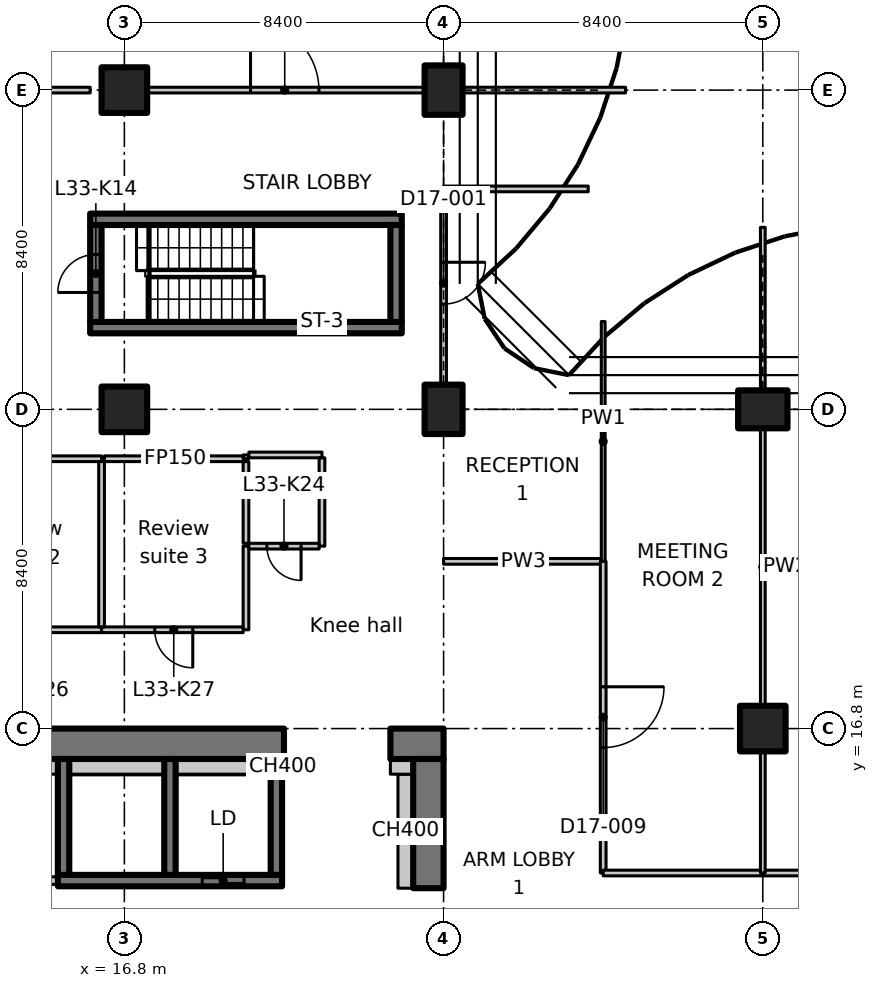
"""IFC4 building model, lengths in metres.
Left out: names, types, materials, properties, quantities, classifications, styles, units other than length and angle.
Written with IfcOpenShell. Run it as: python <this file> out.ifc"""

import sys

from ifc_helpers import new_model, si_unit, direction, frame, frame_2d, origin, origin_2d, place, context, subcontext, project, spatial, polyline, rectangle, outline, extrude, element, fill, save


model = new_model("IFC4")
c1 = context("Model", 3, precision=1e-05, world=origin(), true_north=direction((0.0, 1.0)))
c2 = subcontext(c1, "Body", "Model", "MODEL_VIEW")
j1 = project(units=[si_unit("LENGTHUNIT", "METRE"), si_unit("PLANEANGLEUNIT", "RADIAN")], contexts=[c1])
p1 = place(None, origin())
s1 = spatial("IfcSite", under=j1, at=p1, CompositionType="ELEMENT")
p2 = place(p1, origin())
s2 = spatial("IfcBuilding", under=s1, at=p2, CompositionType="ELEMENT")
p3 = place(p2, frame((0.0, 0.0, 134.9)))
s3 = spatial("IfcBuildingStorey", under=s2, at=p3, CompositionType="ELEMENT", Elevation=134.9)
for number, where, z_axis, x_axis in (
    (1, (16.8, 25.2, 0.0), (0.0, 0.0, 1.0), (1.0, 0.0, 0.0)),
    (2, (16.8, 33.6, 0.0), (0.0, 0.0, 1.0), (1.0, 0.0, 0.0)),
):
    element("IfcColumn", number, at=place(p3, frame(where, z_axis=z_axis, x_axis=x_axis)), inside=s3, PredefinedType="COLUMN", context=c2, shape_type="SweptSolid", body=[
        extrude(rectangle(XDim=1.2, YDim=1.2, at=origin_2d()), origin(), (0.0, 0.0, 1.0), 3.35),
    ])
for number, where, z_axis, x_axis in (
    (3, (25.2, 25.2, 0.0), (0.0, 0.0, 1.0), (1.0, 0.0, 0.0)),
    (4, (25.2, 33.6, 0.0), (0.0, 0.0, 1.0), (1.0, 0.0, 0.0)),
):
    element("IfcColumn", number, at=place(p3, frame(where, z_axis=z_axis, x_axis=x_axis)), inside=s3, PredefinedType="COLUMN", context=c2, shape_type="SweptSolid", body=[
        extrude(rectangle(XDim=1.0, YDim=1.3, at=origin_2d()), origin(), (0.0, 0.0, 1.0), 3.35),
    ])
p4 = place(p3, frame((33.6, 16.8, 0.0), z_axis=(0.0, 0.0, 1.0), x_axis=(1.0, 0.0, 0.0)))
e5 = element("IfcColumn", 5, at=p4, inside=s3, PredefinedType="COLUMN", context=c2, shape_type="SweptSolid", body=[
    extrude(rectangle(XDim=1.2, YDim=1.2, at=origin_2d()), origin(), (0.0, 0.0, 1.0), 3.35),
])
p5 = place(p3, frame((33.6, 25.2, 0.0), z_axis=(0.0, 0.0, 1.0), x_axis=(0.0, 1.0, 0.0)))
e6 = element("IfcColumn", 6, at=p5, inside=s3, PredefinedType="COLUMN", context=c2, shape_type="SweptSolid", body=[
    extrude(rectangle(XDim=1.0, YDim=1.3, at=origin_2d()), origin(), (0.0, 0.0, 1.0), 3.35),
])
p6 = place(p3, frame((-1.1, 16.4, 0.0), z_axis=(0.0, 0.0, 1.0), x_axis=(1.0, 0.0, 0.0)))
e7 = element("IfcWall", 7, at=p6, inside=s3, PredefinedType="SHEAR", context=c2, shape_type="SweptSolid", body=[
    extrude(rectangle(XDim=22.1, YDim=0.8, at=frame_2d((11.05, 0.0))), origin(), (0.0, 0.0, 1.0), 3.35),
])
p7 = place(p6, frame((3.15, 0.0, 0.0)))
e8 = element("IfcOpeningElement", 8, at=p7, cuts=e7, PredefinedType="OPENING", context=c2, shape_type="SweptSolid", body=[
    extrude(rectangle(XDim=1.1, YDim=2.3, at=frame_2d((0.55, 1.15))), frame((0.0, 0.41, 0.0), z_axis=(0.0, -1.0, 0.0), x_axis=(1.0, 0.0, 0.0)), (0.0, 0.0, 1.0), 0.82),
])
p8 = place(p3, frame((23.8, 16.4, 0.0), z_axis=(0.0, 0.0, 1.0), x_axis=(1.0, 0.0, 0.0)))
e9 = element("IfcWall", 9, at=p8, inside=s3, PredefinedType="SHEAR", context=c2, shape_type="SweptSolid", body=[
    extrude(rectangle(XDim=1.4, YDim=0.8, at=frame_2d((0.7, 0.0))), origin(), (0.0, 0.0, 1.0), 3.35),
])
p9 = place(p3, frame((24.8, 12.6, 0.0), z_axis=(0.0, 0.0, 1.0), x_axis=(0.0, 1.0, 0.0)))
e10 = element("IfcWall", 10, at=p9, inside=s3, PredefinedType="SHEAR", context=c2, shape_type="SweptSolid", body=[
    extrude(rectangle(XDim=3.4, YDim=0.8, at=frame_2d((1.7, 0.0))), origin(), (0.0, 0.0, 1.0), 3.35),
])
p10 = place(p3, frame((24.2, 12.6, 0.0), z_axis=(0.0, 0.0, 1.0), x_axis=(0.0, 1.0, 0.0)))
e11 = element("IfcWall", 11, at=p10, inside=s3, PredefinedType="PARTITIONING", context=c2, shape_type="SweptSolid", body=[
    extrude(rectangle(XDim=3.0, YDim=0.4, at=frame_2d((1.5, 0.0))), origin(), (0.0, 0.0, 1.0), 3.35),
])
p11 = place(p3, frame((23.8, 15.8, 0.0), z_axis=(0.0, 0.0, 1.0), x_axis=(1.0, 0.0, 0.0)))
e12 = element("IfcWall", 12, at=p11, inside=s3, PredefinedType="PARTITIONING", context=c2, shape_type="SweptSolid", body=[
    extrude(rectangle(XDim=0.6, YDim=0.4, at=frame_2d((0.3, 0.0))), origin(), (0.0, 0.0, 1.0), 3.35),
])
p12 = place(p3, frame((15.05, 12.8, 0.0), z_axis=(0.0, 0.0, 1.0), x_axis=(1.0, 0.0, 0.0)))
e13 = element("IfcWall", 13, at=p12, inside=s3, PredefinedType="SHEAR", context=c2, shape_type="SweptSolid", body=[
    extrude(rectangle(XDim=5.9, YDim=0.3, at=frame_2d((2.95, 0.0))), origin(), (0.0, 0.0, 1.0), 3.35),
])
p13 = place(p12, frame((3.8, 0.0, 0.0)))
e14 = element("IfcOpeningElement", 14, at=p13, cuts=e13, PredefinedType="OPENING", context=c2, shape_type="SweptSolid", body=[
    extrude(rectangle(XDim=1.1, YDim=2.3, at=frame_2d((0.55, 1.15))), frame((0.0, 0.16, 0.0), z_axis=(0.0, -1.0, 0.0), x_axis=(1.0, 0.0, 0.0)), (0.0, 0.0, 1.0), 0.32),
])
for number, where, z_axis, x_axis in (
    (15, (15.2, 12.95, 0.0), (0.0, 0.0, 1.0), (0.0, 1.0, 0.0)),
    (16, (18.0, 12.95, 0.0), (0.0, 0.0, 1.0), (0.0, 1.0, 0.0)),
    (17, (20.8, 12.95, 0.0), (0.0, 0.0, 1.0), (0.0, 1.0, 0.0)),
):
    element("IfcWall", number, at=place(p3, frame(where, z_axis=z_axis, x_axis=x_axis)), inside=s3, PredefinedType="SHEAR", context=c2, shape_type="SweptSolid", body=[
        extrude(rectangle(XDim=3.05, YDim=0.3, at=frame_2d((1.525, 0.0))), origin(), (0.0, 0.0, 1.0), 3.35),
    ])
for number, where, z_axis, x_axis in (
    (18, (15.9, 27.35, 0.0), (0.0, 0.0, 1.0), (1.0, 0.0, 0.0)),
    (19, (15.9, 30.2, 0.0), (0.0, 0.0, 1.0), (1.0, 0.0, 0.0)),
):
    element("IfcWall", number, at=place(p3, frame(where, z_axis=z_axis, x_axis=x_axis)), inside=s3, PredefinedType="SHEAR", context=c2, shape_type="SweptSolid", body=[
        extrude(rectangle(XDim=8.2, YDim=0.3, at=frame_2d((4.1, 0.0))), origin(), (0.0, 0.0, 1.0), 3.35),
    ])
p14 = place(p3, frame((16.05, 27.5, 0.0), z_axis=(0.0, 0.0, 1.0), x_axis=(0.0, 1.0, 0.0)))
e20 = element("IfcWall", 20, at=p14, inside=s3, PredefinedType="SHEAR", context=c2, shape_type="SweptSolid", body=[
    extrude(rectangle(XDim=2.55, YDim=0.3, at=frame_2d((1.275, 0.0))), origin(), (0.0, 0.0, 1.0), 3.35),
])
p15 = place(p14, frame((0.775, 0.0, 0.0)))
e21 = element("IfcOpeningElement", 21, at=p15, cuts=e20, PredefinedType="OPENING", context=c2, shape_type="SweptSolid", body=[
    extrude(rectangle(XDim=1.0, YDim=2.1, at=frame_2d((0.5, 1.05))), frame((0.0, 0.16, 0.0), z_axis=(0.0, -1.0, 0.0), x_axis=(1.0, 0.0, 0.0)), (0.0, 0.0, 1.0), 0.32),
])
p16 = place(p3, frame((23.95, 27.5, 0.0), z_axis=(0.0, 0.0, 1.0), x_axis=(0.0, 1.0, 0.0)))
e22 = element("IfcWall", 22, at=p16, inside=s3, PredefinedType="SHEAR", context=c2, shape_type="SweptSolid", body=[
    extrude(rectangle(XDim=2.55, YDim=0.3, at=frame_2d((1.275, 0.0))), origin(), (0.0, 0.0, 1.0), 3.35),
])
p17 = place(p3, frame((9.6, 12.8, 0.0), z_axis=(0.0, 0.0, 1.0), x_axis=(1.0, 0.0, 0.0)))
e23 = element("IfcWall", 23, at=p17, inside=s3, PredefinedType="PARTITIONING", context=c2, shape_type="SweptSolid", body=[
    extrude(rectangle(XDim=5.438, YDim=0.2, at=frame_2d((2.719, 0.0))), origin(), (0.0, 0.0, 1.0), 3.35),
])
p18 = place(p17, frame((2.35, 0.0, 0.0)))
e24 = element("IfcOpeningElement", 24, at=p18, cuts=e23, PredefinedType="OPENING", context=c2, shape_type="SweptSolid", body=[
    extrude(rectangle(XDim=0.9, YDim=2.1, at=frame_2d((0.45, 1.05))), frame((0.0, 0.11, 0.0), z_axis=(0.0, -1.0, 0.0), x_axis=(1.0, 0.0, 0.0)), (0.0, 0.0, 1.0), 0.22),
])
p19 = place(p3, frame((16.2, 19.4, 0.0), z_axis=(0.0, 0.0, 1.0), x_axis=(-1.0, 0.0, 0.0)))
e25 = element("IfcWall", 25, at=p19, inside=s3, PredefinedType="PARTITIONING", context=c2, shape_type="SweptSolid", body=[
    extrude(rectangle(XDim=3.9, YDim=0.15, at=frame_2d((1.95, 0.0))), origin(), (0.0, 0.0, 1.0), 3.35),
])
p20 = place(p19, frame((1.45, 0.0, 0.0)))
e26 = element("IfcOpeningElement", 26, at=p20, cuts=e25, PredefinedType="OPENING", context=c2, shape_type="SweptSolid", body=[
    extrude(rectangle(XDim=1.0, YDim=2.1, at=frame_2d((0.5, 1.05))), frame((0.0, 0.085, 0.0), z_axis=(0.0, -1.0, 0.0), x_axis=(1.0, 0.0, 0.0)), (0.0, 0.0, 1.0), 0.17),
])
p21 = place(p3, frame((12.375, 23.9, 0.0), z_axis=(0.0, 0.0, 1.0), x_axis=(1.0, 0.0, 0.0)))
e27 = element("IfcWall", 27, at=p21, inside=s3, PredefinedType="PARTITIONING", context=c2, shape_type="SweptSolid", body=[
    extrude(rectangle(XDim=3.825, YDim=0.15, at=frame_2d((1.913, 0.0))), origin(), (0.0, 0.0, 1.0), 3.35),
])
p22 = place(p3, frame((20.0, 21.6, 0.0), z_axis=(0.0, 0.0, 1.0), x_axis=(0.0, -1.0, 0.0)))
e28 = element("IfcWall", 28, at=p22, inside=s3, PredefinedType="PARTITIONING", context=c2, shape_type="SweptSolid", body=[
    extrude(rectangle(XDim=2.2, YDim=0.15, at=frame_2d((1.1, 0.0))), origin(), (0.0, 0.0, 1.0), 3.35),
])
p23 = place(p3, frame((19.925, 19.4, 0.0), z_axis=(0.0, 0.0, 1.0), x_axis=(-1.0, 0.0, 0.0)))
e29 = element("IfcWall", 29, at=p23, inside=s3, PredefinedType="PARTITIONING", context=c2, shape_type="SweptSolid", body=[
    extrude(rectangle(XDim=3.725, YDim=0.15, at=frame_2d((1.863, 0.0))), origin(), (0.0, 0.0, 1.0), 3.35),
])
p24 = place(p23, frame((1.325, 0.0, 0.0)))
e30 = element("IfcOpeningElement", 30, at=p24, cuts=e29, PredefinedType="OPENING", context=c2, shape_type="SweptSolid", body=[
    extrude(rectangle(XDim=1.0, YDim=2.1, at=frame_2d((0.5, 1.05))), frame((0.0, 0.085, 0.0), z_axis=(0.0, -1.0, 0.0), x_axis=(1.0, 0.0, 0.0)), (0.0, 0.0, 1.0), 0.17),
])
p25 = place(p3, frame((16.2, 23.825, 0.0), z_axis=(0.0, 0.0, 1.0), x_axis=(0.0, -1.0, 0.0)))
e31 = element("IfcWall", 31, at=p25, inside=s3, PredefinedType="PARTITIONING", context=c2, shape_type="SweptSolid", body=[
    extrude(rectangle(XDim=4.35, YDim=0.15, at=frame_2d((2.175, 0.0))), origin(), (0.0, 0.0, 1.0), 3.35),
])
p26 = place(p3, frame((16.275, 23.9, 0.0), z_axis=(0.0, 0.0, 1.0), x_axis=(1.0, 0.0, 0.0)))
e32 = element("IfcWall", 32, at=p26, inside=s3, PredefinedType="PARTITIONING", context=c2, shape_type="SweptSolid", body=[
    extrude(rectangle(XDim=3.725, YDim=0.15, at=frame_2d((1.863, 0.0))), origin(), (0.0, 0.0, 1.0), 3.35),
])
p27 = place(p3, frame((20.0, 23.9, 0.0), z_axis=(0.0, 0.0, 1.0), x_axis=(0.0, 1.0, 0.0)))
e33 = element("IfcWall", 33, at=p27, inside=s3, PredefinedType="PARTITIONING", context=c2, shape_type="SweptSolid", body=[
    extrude(rectangle(XDim=0.1, YDim=0.15, at=frame_2d((0.05, 0.0))), origin(), (0.0, 0.0, 1.0), 3.35),
])
p28 = place(p3, frame((20.075, 24.0, 0.0), z_axis=(0.0, 0.0, 1.0), x_axis=(1.0, 0.0, 0.0)))
e34 = element("IfcWall", 34, at=p28, inside=s3, PredefinedType="PARTITIONING", context=c2, shape_type="SweptSolid", body=[
    extrude(rectangle(XDim=1.925, YDim=0.15, at=frame_2d((0.962, 0.0))), origin(), (0.0, 0.0, 1.0), 3.35),
])
p29 = place(p3, frame((22.0, 23.925, 0.0), z_axis=(0.0, 0.0, 1.0), x_axis=(0.0, -1.0, 0.0)))
e35 = element("IfcWall", 35, at=p29, inside=s3, PredefinedType="PARTITIONING", context=c2, shape_type="SweptSolid", body=[
    extrude(rectangle(XDim=2.325, YDim=0.15, at=frame_2d((1.163, 0.0))), origin(), (0.0, 0.0, 1.0), 3.35),
])
p30 = place(p3, frame((21.925, 21.6, 0.0), z_axis=(0.0, 0.0, 1.0), x_axis=(-1.0, 0.0, 0.0)))
e36 = element("IfcWall", 36, at=p30, inside=s3, PredefinedType="PARTITIONING", context=c2, shape_type="SweptSolid", body=[
    extrude(rectangle(XDim=1.85, YDim=0.15, at=frame_2d((0.925, 0.0))), origin(), (0.0, 0.0, 1.0), 3.35),
])
p31 = place(p30, frame((0.475, 0.0, 0.0)))
e37 = element("IfcOpeningElement", 37, at=p31, cuts=e36, PredefinedType="OPENING", context=c2, shape_type="SweptSolid", body=[
    extrude(rectangle(XDim=0.9, YDim=2.1, at=frame_2d((0.45, 1.05))), frame((0.0, 0.085, 0.0), z_axis=(0.0, -1.0, 0.0), x_axis=(1.0, 0.0, 0.0)), (0.0, 0.0, 1.0), 0.17),
])
p32 = place(p3, frame((20.0, 21.675, 0.0), z_axis=(0.0, 0.0, 1.0), x_axis=(0.0, 1.0, 0.0)))
e38 = element("IfcWall", 38, at=p32, inside=s3, PredefinedType="PARTITIONING", context=c2, shape_type="SweptSolid", body=[
    extrude(rectangle(XDim=2.15, YDim=0.15, at=frame_2d((1.075, 0.0))), origin(), (0.0, 0.0, 1.0), 3.35),
])
p33 = place(p3, frame((4.15, 15.8, 0.0), z_axis=(0.0, 0.0, 1.0), x_axis=(1.0, 0.0, 0.0)))
e39 = element("IfcWall", 39, at=p33, inside=s3, PredefinedType="PARTITIONING", context=c2, shape_type="SweptSolid", body=[
    extrude(rectangle(XDim=10.9, YDim=0.4, at=frame_2d((5.45, 0.0))), origin(), (0.0, 0.0, 1.0), 3.35),
])
for number, where, z_axis, x_axis in (
    (40, (15.35, 15.8, 0.0), (0.0, 0.0, 1.0), (1.0, 0.0, 0.0)),
    (41, (18.15, 15.8, 0.0), (0.0, 0.0, 1.0), (1.0, 0.0, 0.0)),
):
    element("IfcWall", number, at=place(p3, frame(where, z_axis=z_axis, x_axis=x_axis)), inside=s3, PredefinedType="PARTITIONING", context=c2, shape_type="SweptSolid", body=[
        extrude(rectangle(XDim=2.5, YDim=0.4, at=frame_2d((1.25, 0.0))), origin(), (0.0, 0.0, 1.0), 3.35),
    ])
p34 = place(p3, frame((20.95, 15.8, 0.0), z_axis=(0.0, 0.0, 1.0), x_axis=(1.0, 0.0, 0.0)))
e42 = element("IfcWall", 42, at=p34, inside=s3, PredefinedType="PARTITIONING", context=c2, shape_type="SweptSolid", body=[
    extrude(rectangle(XDim=0.05, YDim=0.4, at=frame_2d((0.025, 0.0))), origin(), (0.0, 0.0, 1.0), 3.35),
])
p35 = place(p3, frame((25.2, 21.2, 0.0), z_axis=(0.0, 0.0, 1.0), x_axis=(1.0, 0.0, 0.0)))
e43 = element("IfcWall", 43, at=p35, inside=s3, PredefinedType="PARTITIONING", context=c2, shape_type="SweptSolid", body=[
    extrude(rectangle(XDim=4.2, YDim=0.15, at=frame_2d((2.1, 0.0))), origin(), (0.0, 0.0, 1.0), 3.33),
])
p36 = place(p3, frame((29.4, 21.2, 0.0), z_axis=(0.0, 0.0, 1.0), x_axis=(0.0, -1.0, 0.0)))
e44 = element("IfcWall", 44, at=p36, inside=s3, PredefinedType="PARTITIONING", context=c2, shape_type="SweptSolid", body=[
    extrude(rectangle(XDim=8.2, YDim=0.15, at=frame_2d((4.1, 0.0))), origin(), (0.0, 0.0, 1.0), 3.33),
])
p37 = place(p36, frame((3.3, 0.0, 0.0)))
e45 = element("IfcOpeningElement", 45, at=p37, cuts=e44, PredefinedType="OPENING", context=c2, shape_type="SweptSolid", body=[
    extrude(rectangle(XDim=1.6, YDim=2.1, at=frame_2d((0.8, 1.05))), frame((0.0, 0.085, 0.0), z_axis=(0.0, -1.0, 0.0), x_axis=(1.0, 0.0, 0.0)), (0.0, 0.0, 1.0), 0.17),
])
p38 = place(p3, frame((29.4, 27.511, 0.0), z_axis=(0.0, 0.0, 1.0), x_axis=(0.0, -1.0, 0.0)))
e46 = element("IfcWall", 46, at=p38, inside=s3, PredefinedType="PARTITIONING", context=c2, shape_type="SweptSolid", body=[
    extrude(outline(polyline([(0.0, 0.0), (6.311, 0.0), (6.311, 3.33), (2.761, 3.33), (2.759, 2.98), (1.863, 2.98), (1.861, 3.33), (0.236, 3.33), (0.0, 3.33), (0.0, 0.0)])), frame((0.0, 0.05, 0.0), z_axis=(0.0, -1.0, 0.0), x_axis=(1.0, 0.0, 0.0)), (0.0, 0.0, 1.0), 0.1),
])
p39 = place(p3, frame((25.2, 31.0, 0.0), z_axis=(0.0, 0.0, 1.0), x_axis=(0.0, -1.0, 0.0)))
e47 = element("IfcWall", 47, at=p39, inside=s3, PredefinedType="PARTITIONING", context=c2, shape_type="SweptSolid", body=[
    extrude(outline(polyline([(0.0, 0.0), (5.13, 0.0), (5.13, 2.98), (0.0, 2.98), (0.0, 0.0)])), frame((0.0, 0.075, 0.0), z_axis=(0.0, -1.0, 0.0), x_axis=(1.0, 0.0, 0.0)), (0.0, 0.0, 1.0), 0.15),
])
p40 = place(p39, frame((1.93, 0.0, 0.0)))
e48 = element("IfcOpeningElement", 48, at=p40, cuts=e47, PredefinedType="OPENING", context=c2, shape_type="SweptSolid", body=[
    extrude(rectangle(XDim=1.1, YDim=2.1, at=frame_2d((0.55, 1.05))), frame((0.0, 0.085, 0.0), z_axis=(0.0, -1.0, 0.0), x_axis=(1.0, 0.0, 0.0)), (0.0, 0.0, 1.0), 0.17),
])
p41 = place(p3, frame((25.2, 31.0, 0.0), z_axis=(0.0, 0.0, 1.0), x_axis=(1.0, 0.0, 0.0)))
e49 = element("IfcWall", 49, at=p41, inside=s3, PredefinedType="PARTITIONING", context=c2, shape_type="SweptSolid", body=[
    extrude(rectangle(XDim=3.806, YDim=0.15, at=frame_2d((1.903, 0.0))), origin(), (0.0, 0.0, 1.0), 2.98),
])
p42 = place(p3, frame((29.4, 13.0, 0.0), z_axis=(0.0, 0.0, 1.0), x_axis=(1.0, 0.0, 0.0)))
e50 = element("IfcWall", 50, at=p42, inside=s3, PredefinedType="PARTITIONING", context=c2, shape_type="SweptSolid", body=[
    extrude(rectangle(XDim=4.2, YDim=0.15, at=frame_2d((2.1, 0.0))), origin(), (0.0, 0.0, 1.0), 3.33),
])
p43 = place(p3, frame((33.6, 13.0, 0.0), z_axis=(0.0, 0.0, 1.0), x_axis=(1.0, 0.0, 0.0)))
e51 = element("IfcWall", 51, at=p43, inside=s3, PredefinedType="PARTITIONING", context=c2, shape_type="SweptSolid", body=[
    extrude(rectangle(XDim=7.6, YDim=0.15, at=frame_2d((3.8, 0.0))), origin(), (0.0, 0.0, 1.0), 3.33),
])
p44 = place(p43, frame((3.0, 0.0, 0.0)))
e52 = element("IfcOpeningElement", 52, at=p44, cuts=e51, PredefinedType="OPENING", context=c2, shape_type="SweptSolid", body=[
    extrude(rectangle(XDim=1.8, YDim=2.1, at=frame_2d((0.9, 1.05))), frame((0.0, 0.085, 0.0), z_axis=(0.0, -1.0, 0.0), x_axis=(1.0, 0.0, 0.0)), (0.0, 0.0, 1.0), 0.17),
])
p45 = place(p3, frame((33.6, 29.988, 0.0), z_axis=(0.0, 0.0, 1.0), x_axis=(0.0, -1.0, 0.0)))
e53 = element("IfcWall", 53, at=p45, inside=s3, PredefinedType="PARTITIONING", context=c2, shape_type="SweptSolid", body=[
    extrude(rectangle(XDim=4.268, YDim=0.125, at=frame_2d((2.134, 0.0))), origin(), (0.0, 0.0, 1.0), 2.98),
])
p46 = place(p3, frame((33.6, 24.68, 0.0), z_axis=(0.0, 0.0, 1.0), x_axis=(0.0, -1.0, 0.0)))
e54 = element("IfcWall", 54, at=p46, inside=s3, PredefinedType="PARTITIONING", context=c2, shape_type="SweptSolid", body=[
    extrude(rectangle(XDim=7.26, YDim=0.125, at=frame_2d((3.63, 0.0))), origin(), (0.0, 0.0, 1.0), 3.33),
])
p47 = place(p3, frame((33.6, 16.18, 0.0), z_axis=(0.0, 0.0, 1.0), x_axis=(0.0, -1.0, 0.0)))
e55 = element("IfcWall", 55, at=p47, inside=s3, PredefinedType="PARTITIONING", context=c2, shape_type="SweptSolid", body=[
    extrude(rectangle(XDim=3.18, YDim=0.125, at=frame_2d((1.59, 0.0))), origin(), (0.0, 0.0, 1.0), 3.33),
])
p48 = place(p3, frame((14.4, 33.6, 0.0), z_axis=(0.0, 0.0, 1.0), x_axis=(1.0, 0.0, 0.0)))
e56 = element("IfcWall", 56, at=p48, inside=s3, PredefinedType="PARTITIONING", context=c2, shape_type="SweptSolid", body=[
    extrude(rectangle(XDim=1.5, YDim=0.15, at=frame_2d((0.75, 0.0))), origin(), (0.0, 0.0, 1.0), 3.33),
])
p49 = place(p3, frame((17.42, 33.6, 0.0), z_axis=(0.0, 0.0, 1.0), x_axis=(1.0, 0.0, 0.0)))
e57 = element("IfcWall", 57, at=p49, inside=s3, PredefinedType="PARTITIONING", context=c2, shape_type="SweptSolid", body=[
    extrude(rectangle(XDim=7.26, YDim=0.15, at=frame_2d((3.63, 0.0))), origin(), (0.0, 0.0, 1.0), 3.33),
])
p50 = place(p49, frame((2.7, 0.0, 0.0)))
e58 = element("IfcOpeningElement", 58, at=p50, cuts=e57, PredefinedType="OPENING", context=c2, shape_type="SweptSolid", body=[
    extrude(rectangle(XDim=1.8, YDim=2.1, at=frame_2d((0.9, 1.05))), frame((0.0, 0.085, 0.0), z_axis=(0.0, -1.0, 0.0), x_axis=(1.0, 0.0, 0.0)), (0.0, 0.0, 1.0), 0.17),
])
p51 = place(p3, frame((25.72, 33.6, 0.0), z_axis=(0.0, 0.0, 1.0), x_axis=(1.0, 0.0, 0.0)))
e59 = element("IfcWall", 59, at=p51, inside=s3, PredefinedType="PARTITIONING", context=c2, shape_type="SweptSolid", body=[
    extrude(rectangle(XDim=4.268, YDim=0.15, at=frame_2d((2.134, 0.0))), origin(), (0.0, 0.0, 1.0), 2.98),
])
p52 = place(p13, origin())
e60 = element("IfcDoor", 60, at=p52, inside=s3, OperationType="SLIDING_TO_LEFT", PredefinedType="DOOR", context=c2, shape_type="SweptSolid", body=[
    extrude(rectangle(XDim=1.1, YDim=2.3, at=frame_2d((0.55, 1.15))), frame((0.0, 0.025, 0.0), z_axis=(0.0, -1.0, 0.0), x_axis=(1.0, 0.0, 0.0)), (0.0, 0.0, 1.0), 0.05),
])
fill(e14, e60)
p53 = place(p15, origin())
e61 = element("IfcDoor", 61, at=p53, inside=s3, OperationType="SINGLE_SWING_RIGHT", PredefinedType="DOOR", context=c2, shape_type="SweptSolid", body=[
    extrude(rectangle(XDim=1.0, YDim=2.1, at=frame_2d((0.5, 1.05))), frame((0.0, 0.025, 0.0), z_axis=(0.0, -1.0, 0.0), x_axis=(1.0, 0.0, 0.0)), (0.0, 0.0, 1.0), 0.05),
])
fill(e21, e61)
p54 = place(p31, origin())
e62 = element("IfcDoor", 62, at=p54, inside=s3, OperationType="SINGLE_SWING_RIGHT", PredefinedType="DOOR", context=c2, shape_type="SweptSolid", body=[
    extrude(rectangle(XDim=0.9, YDim=2.1, at=frame_2d((0.45, 1.05))), frame((0.0, 0.025, 0.0), z_axis=(0.0, -1.0, 0.0), x_axis=(1.0, 0.0, 0.0)), (0.0, 0.0, 1.0), 0.05),
])
fill(e37, e62)
p55 = place(p24, origin())
e63 = element("IfcDoor", 63, at=p55, inside=s3, OperationType="SINGLE_SWING_LEFT", PredefinedType="DOOR", context=c2, shape_type="SweptSolid", body=[
    extrude(rectangle(XDim=1.0, YDim=2.1, at=frame_2d((0.5, 1.05))), frame((0.0, 0.025, 0.0), z_axis=(0.0, -1.0, 0.0), x_axis=(1.0, 0.0, 0.0)), (0.0, 0.0, 1.0), 0.05),
])
fill(e30, e63)
p56 = place(p40, origin())
e64 = element("IfcDoor", 64, at=p56, inside=s3, OperationType="SINGLE_SWING_RIGHT", PredefinedType="DOOR", context=c2, shape_type="SweptSolid", body=[
    extrude(rectangle(XDim=1.1, YDim=2.1, at=frame_2d((0.55, 1.05))), frame((0.0, 0.025, 0.0), z_axis=(0.0, -1.0, 0.0), x_axis=(1.0, 0.0, 0.0)), (0.0, 0.0, 1.0), 0.05),
])
fill(e48, e64)
p57 = place(p37, origin())
e65 = element("IfcDoor", 65, at=p57, inside=s3, OperationType="DOUBLE_DOOR_SINGLE_SWING", PredefinedType="DOOR", context=c2, shape_type="SweptSolid", body=[
    extrude(rectangle(XDim=1.6, YDim=2.1, at=frame_2d((0.8, 1.05))), frame((0.0, 0.025, 0.0), z_axis=(0.0, -1.0, 0.0), x_axis=(1.0, 0.0, 0.0)), (0.0, 0.0, 1.0), 0.05),
])
fill(e45, e65)
p58 = place(p50, origin())
e66 = element("IfcDoor", 66, at=p58, inside=s3, OperationType="DOUBLE_DOOR_SINGLE_SWING", PredefinedType="DOOR", context=c2, shape_type="SweptSolid", body=[
    extrude(rectangle(XDim=1.8, YDim=2.1, at=frame_2d((0.9, 1.05))), frame((0.0, 0.025, 0.0), z_axis=(0.0, -1.0, 0.0), x_axis=(1.0, 0.0, 0.0)), (0.0, 0.0, 1.0), 0.05),
])
fill(e58, e66)
save(model, sys.argv[1])
